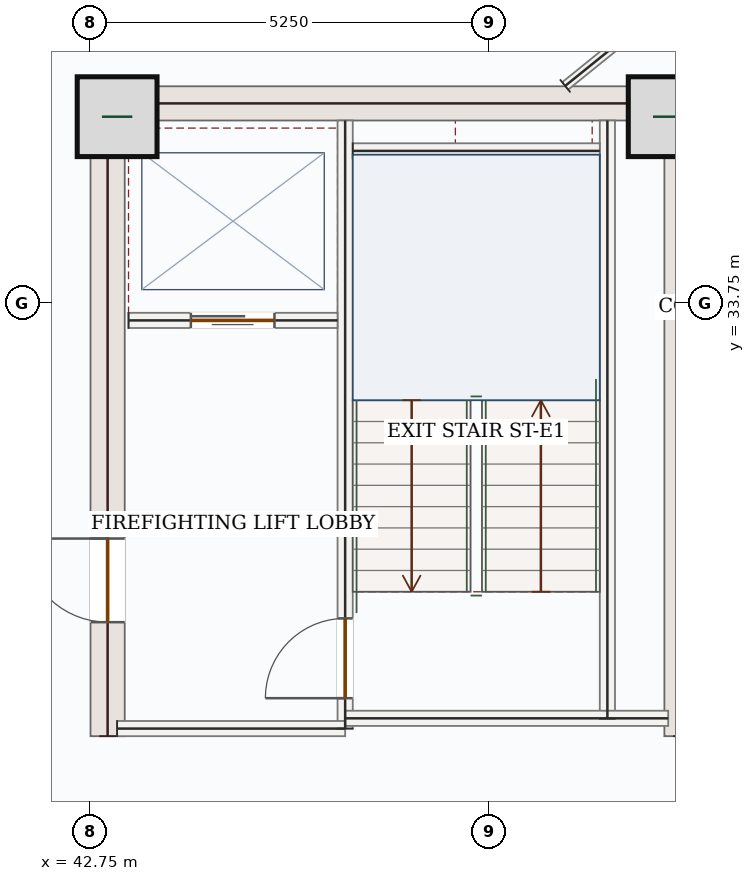
"""IFC4 building model, lengths in metres.
Left out: names, types, materials, properties, quantities, classifications, styles, units other than length and angle.
Written with IfcOpenShell. Run it as: python <this file> out.ifc"""

import sys

from ifc_helpers import new_model, si_unit, direction, frame, frame_2d, origin, origin_2d, place, context, subcontext, project, spatial, rectangle, extrude, source, transform, mapped, element, fill, save


model = new_model("IFC4")
c1 = context("Model", 3, precision=1e-05, world=origin(), true_north=direction((0.0, 1.0)))
c2 = subcontext(c1, "Body", "Model", "MODEL_VIEW")
j1 = project(units=[si_unit("LENGTHUNIT", "METRE"), si_unit("PLANEANGLEUNIT", "RADIAN")], contexts=[c1])
p1 = place(None, origin())
s1 = spatial("IfcSite", under=j1, at=p1, CompositionType="ELEMENT")
p2 = place(p1, origin())
s2 = spatial("IfcBuilding", under=s1, at=p2, CompositionType="ELEMENT")
p3 = place(p2, frame((0.0, 0.0, 280.35)))
s3 = spatial("IfcBuildingStorey", under=s2, at=p3, CompositionType="ELEMENT", Elevation=280.35)
p4 = place(p3, frame((42.975, 28.05, 0.0), z_axis=(0.0, 0.0, 1.0), x_axis=(0.0, 1.0, 0.0)))
e1 = element("IfcWall", 1, at=p4, inside=s3, PredefinedType="SHEAR", context=c2, shape_type="SweptSolid", body=[
    extrude(rectangle(XDim=8.55, YDim=0.45, at=frame_2d((4.275, 0.0))), origin(), (0.0, 0.0, 1.0), 3.5),
])
p5 = place(p4, frame((1.5, 0.0, 0.0)))
e2 = element("IfcOpeningElement", 2, at=p5, cuts=e1, PredefinedType="OPENING", context=c2, shape_type="SweptSolid", body=[
    extrude(rectangle(XDim=1.1, YDim=2.2, at=frame_2d((0.55, 1.1))), frame((0.0, 0.235, 0.0), z_axis=(0.0, -1.0, 0.0), x_axis=(1.0, 0.0, 0.0)), (0.0, 0.0, 1.0), 0.47),
])
m1 = source(origin(), c2, "Body", "SweptSolid", [
    extrude(rectangle(XDim=8.55, YDim=0.45, at=frame_2d((4.275, 0.0))), origin(), (0.0, 0.0, 1.0), 3.5),
])
p6 = place(p3, frame((50.525, 28.05, 0.0), z_axis=(0.0, 0.0, 1.0), x_axis=(0.0, 1.0, 0.0)))
e3 = element("IfcWall", 3, at=p6, inside=s3, PredefinedType="SHEAR", context=c2, shape_type="MappedRepresentation", body=[
    mapped(m1, transform((0.0, 0.0, 0.0), x_axis=(1.0, 0.0, 0.0), y_axis=(0.0, 1.0, 0.0), z_axis=(0.0, 0.0, 1.0), scale=1.0)),
])
m2 = source(origin(), c2, "Body", "SweptSolid", [
    extrude(rectangle(XDim=7.1, YDim=0.45, at=frame_2d((3.55, 0.0))), origin(), (0.0, 0.0, 1.0), 3.5),
])
p7 = place(p3, frame((43.2, 36.375, 0.0), z_axis=(0.0, 0.0, 1.0), x_axis=(1.0, 0.0, 0.0)))
e4 = element("IfcWall", 4, at=p7, inside=s3, PredefinedType="SHEAR", context=c2, shape_type="MappedRepresentation", body=[
    mapped(m2, transform((0.0, 0.0, 0.0), x_axis=(1.0, 0.0, 0.0), y_axis=(0.0, 1.0, 0.0), z_axis=(0.0, 0.0, 1.0), scale=1.0)),
])
m3 = source(origin(), c2, "Body", "SweptSolid", [
    extrude(rectangle(XDim=1.05, YDim=1.05, at=origin_2d()), origin(), (0.0, 0.0, 1.0), 3.75),
])
for number, where, z_axis, x_axis in (
    (5, (43.1, 36.2, 0.0), (0.0, 0.0, 1.0), (1.0, 0.0, 0.0)),
    (6, (50.35, 36.2, 0.0), (0.0, 0.0, 1.0), (1.0, 0.0, 0.0)),
):
    element("IfcColumn", number, at=place(p3, frame(where, z_axis=z_axis, x_axis=x_axis)), inside=s3, PredefinedType="COLUMN", context=c2, shape_type="MappedRepresentation", body=[
        mapped(m3, transform((0.0, 0.0, 0.0), x_axis=(1.0, 0.0, 0.0), y_axis=(0.0, 1.0, 0.0), z_axis=(0.0, 0.0, 1.0), scale=1.0)),
    ])
p8 = place(p3, frame((50.26, 38.342, 0.0), z_axis=(0.0, 0.0, 1.0), x_axis=(0.707106781187, -0.707106781187, 0.0)))
e7 = element("IfcWall", 7, at=p8, inside=s3, PredefinedType="SOLIDWALL", context=c2, shape_type="SweptSolid", body=[
    extrude(rectangle(XDim=3.96, YDim=0.28, at=frame_2d((1.98, 0.0))), origin(), (0.0, 0.0, 1.0), 3.5),
])
p9 = place(p8, frame((1.23, 0.0, 0.85)))
e8 = element("IfcOpeningElement", 8, at=p9, cuts=e7, PredefinedType="OPENING", context=c2, shape_type="SweptSolid", body=[
    extrude(rectangle(XDim=1.5, YDim=1.5, at=frame_2d((0.75, 0.75))), frame((0.0, 0.15, 0.0), z_axis=(0.0, -1.0, 0.0), x_axis=(1.0, 0.0, 0.0)), (0.0, 0.0, 1.0), 0.3),
])
m4 = source(origin(), c2, "Body", "SweptSolid", [
    extrude(rectangle(XDim=7.87, YDim=0.2, at=frame_2d((3.935, 0.0))), origin(), (0.0, 0.0, 1.0), 3.5),
])
p10 = place(p3, frame((49.55, 28.28, 0.0), z_axis=(0.0, 0.0, 1.0), x_axis=(0.0, 1.0, 0.0)))
e9 = element("IfcWall", 9, at=p10, inside=s3, PredefinedType="SOLIDWALL", context=c2, shape_type="MappedRepresentation", body=[
    mapped(m4, transform((0.0, 0.0, 0.0), x_axis=(1.0, 0.0, 0.0), y_axis=(0.0, 1.0, 0.0), z_axis=(0.0, 0.0, 1.0), scale=1.0)),
])
p11 = place(p3, frame((46.1, 28.15, 0.0), z_axis=(0.0, 0.0, 1.0), x_axis=(0.0, 1.0, 0.0)))
e10 = element("IfcWall", 10, at=p11, inside=s3, PredefinedType="SOLIDWALL", context=c2, shape_type="SweptSolid", body=[
    extrude(rectangle(XDim=8.0, YDim=0.2, at=frame_2d((4.0, 0.0))), origin(), (0.0, 0.0, 1.0), 3.5),
])
p12 = place(p11, frame((0.4, 0.0, 0.0)))
e11 = element("IfcOpeningElement", 11, at=p12, cuts=e10, PredefinedType="OPENING", context=c2, shape_type="SweptSolid", body=[
    extrude(rectangle(XDim=1.05, YDim=2.15, at=frame_2d((0.525, 1.075))), frame((0.0, 0.11, 0.0), z_axis=(0.0, -1.0, 0.0), x_axis=(1.0, 0.0, 0.0)), (0.0, 0.0, 1.0), 0.22),
])
m5 = source(origin(), c2, "Body", "SweptSolid", [
    extrude(rectangle(XDim=3.0, YDim=0.2, at=frame_2d((1.5, 0.0))), origin(), (0.0, 0.0, 1.0), 3.5),
])
p13 = place(p3, frame((43.1, 28.15, 0.0), z_axis=(0.0, 0.0, 1.0), x_axis=(1.0, 0.0, 0.0)))
e12 = element("IfcWall", 12, at=p13, inside=s3, PredefinedType="SOLIDWALL", context=c2, shape_type="MappedRepresentation", body=[
    mapped(m5, transform((0.0, 0.0, 0.0), x_axis=(1.0, 0.0, 0.0), y_axis=(0.0, 1.0, 0.0), z_axis=(0.0, 0.0, 1.0), scale=1.0)),
])
m6 = source(origin(), c2, "Body", "SweptSolid", [
    extrude(rectangle(XDim=4.25, YDim=0.2, at=frame_2d((2.125, 0.0))), origin(), (0.0, 0.0, 1.0), 3.5),
])
p14 = place(p3, frame((46.1, 28.285, 0.0), z_axis=(0.0, 0.0, 1.0), x_axis=(1.0, 0.0, 0.0)))
e13 = element("IfcWall", 13, at=p14, inside=s3, PredefinedType="SOLIDWALL", context=c2, shape_type="MappedRepresentation", body=[
    mapped(m6, transform((0.0, 0.0, 0.0), x_axis=(1.0, 0.0, 0.0), y_axis=(0.0, 1.0, 0.0), z_axis=(0.0, 0.0, 1.0), scale=1.0)),
])
m7 = source(origin(), c2, "Body", "SweptSolid", [
    extrude(rectangle(XDim=3.25, YDim=0.2, at=frame_2d((1.625, 0.0))), origin(), (0.0, 0.0, 1.0), 3.5),
])
p15 = place(p3, frame((46.2, 35.75, 0.0), z_axis=(0.0, 0.0, 1.0), x_axis=(1.0, 0.0, 0.0)))
e14 = element("IfcWall", 14, at=p15, inside=s3, PredefinedType="SOLIDWALL", context=c2, shape_type="MappedRepresentation", body=[
    mapped(m7, transform((0.0, 0.0, 0.0), x_axis=(1.0, 0.0, 0.0), y_axis=(0.0, 1.0, 0.0), z_axis=(0.0, 0.0, 1.0), scale=1.0)),
])
p16 = place(p3, frame((43.25, 33.52, 0.0), z_axis=(0.0, 0.0, 1.0), x_axis=(1.0, 0.0, 0.0)))
e15 = element("IfcWall", 15, at=p16, inside=s3, PredefinedType="SOLIDWALL", context=c2, shape_type="SweptSolid", body=[
    extrude(rectangle(XDim=2.75, YDim=0.2, at=frame_2d((1.375, 0.0))), origin(), (0.0, 0.0, 1.0), 3.5),
])
p17 = place(p16, frame((0.82, 0.0, 0.0)))
e16 = element("IfcOpeningElement", 16, at=p17, cuts=e15, PredefinedType="OPENING", context=c2, shape_type="SweptSolid", body=[
    extrude(rectangle(XDim=1.1, YDim=2.15, at=frame_2d((0.55, 1.075))), frame((0.0, 0.11, 0.0), z_axis=(0.0, -1.0, 0.0), x_axis=(1.0, 0.0, 0.0)), (0.0, 0.0, 1.0), 0.22),
])
m8 = source(origin(), c2, "Body", "SweptSolid", [
    extrude(rectangle(XDim=1.989, YDim=0.125, at=frame_2d((0.995, 0.0))), origin(), (0.0, 0.0, 1.0), 3.5),
])
p18 = place(p3, frame((48.995, 36.605, 0.0), z_axis=(0.0, 0.0, 1.0), x_axis=(0.778058853423, 0.628191388519, 0.0)))
e17 = element("IfcWall", 17, at=p18, inside=s3, PredefinedType="PARTITIONING", context=c2, shape_type="MappedRepresentation", body=[
    mapped(m8, transform((0.0, 0.0, 0.0), x_axis=(1.0, 0.0, 0.0), y_axis=(0.0, 1.0, 0.0), z_axis=(0.0, 0.0, 1.0), scale=1.0)),
])
m9 = source(origin(), c2, "Body", "SweptSolid", [
    extrude(rectangle(XDim=1.05, YDim=2.15, at=frame_2d((0.525, 1.075))), frame((0.0, 0.025, 0.0), z_axis=(0.0, -1.0, 0.0), x_axis=(1.0, 0.0, 0.0)), (0.0, 0.0, 1.0), 0.05),
])
p19 = place(p12, origin())
e18 = element("IfcDoor", 18, at=p19, inside=s3, OperationType="SINGLE_SWING_LEFT", PredefinedType="DOOR", context=c2, shape_type="MappedRepresentation", body=[
    mapped(m9, transform((0.0, 0.0, 0.0), x_axis=(1.0, 0.0, 0.0), y_axis=(0.0, 1.0, 0.0), z_axis=(0.0, 0.0, 1.0), scale=1.0)),
])
fill(e11, e18)
m10 = source(origin(), c2, "Body", "SweptSolid", [
    extrude(rectangle(XDim=1.1, YDim=2.15, at=frame_2d((0.55, 1.075))), frame((0.0, 0.025, 0.0), z_axis=(0.0, -1.0, 0.0), x_axis=(1.0, 0.0, 0.0)), (0.0, 0.0, 1.0), 0.05),
])
p20 = place(p17, origin())
e19 = element("IfcDoor", 19, at=p20, inside=s3, OperationType="DOUBLE_DOOR_SLIDING", PredefinedType="DOOR", context=c2, shape_type="MappedRepresentation", body=[
    mapped(m10, transform((0.0, 0.0, 0.0), x_axis=(1.0, 0.0, 0.0), y_axis=(0.0, 1.0, 0.0), z_axis=(0.0, 0.0, 1.0), scale=1.0)),
])
fill(e16, e19)
m11 = source(origin(), c2, "Body", "SweptSolid", [
    extrude(rectangle(XDim=1.1, YDim=2.2, at=frame_2d((0.55, 1.1))), frame((0.0, 0.025, 0.0), z_axis=(0.0, -1.0, 0.0), x_axis=(1.0, 0.0, 0.0)), (0.0, 0.0, 1.0), 0.05),
])
p21 = place(p5, origin())
e20 = element("IfcDoor", 20, at=p21, inside=s3, OperationType="SINGLE_SWING_RIGHT", PredefinedType="DOOR", context=c2, shape_type="MappedRepresentation", body=[
    mapped(m11, transform((0.0, 0.0, 0.0), x_axis=(1.0, 0.0, 0.0), y_axis=(0.0, 1.0, 0.0), z_axis=(0.0, 0.0, 1.0), scale=1.0)),
])
fill(e2, e20)
save(model, sys.argv[1])
